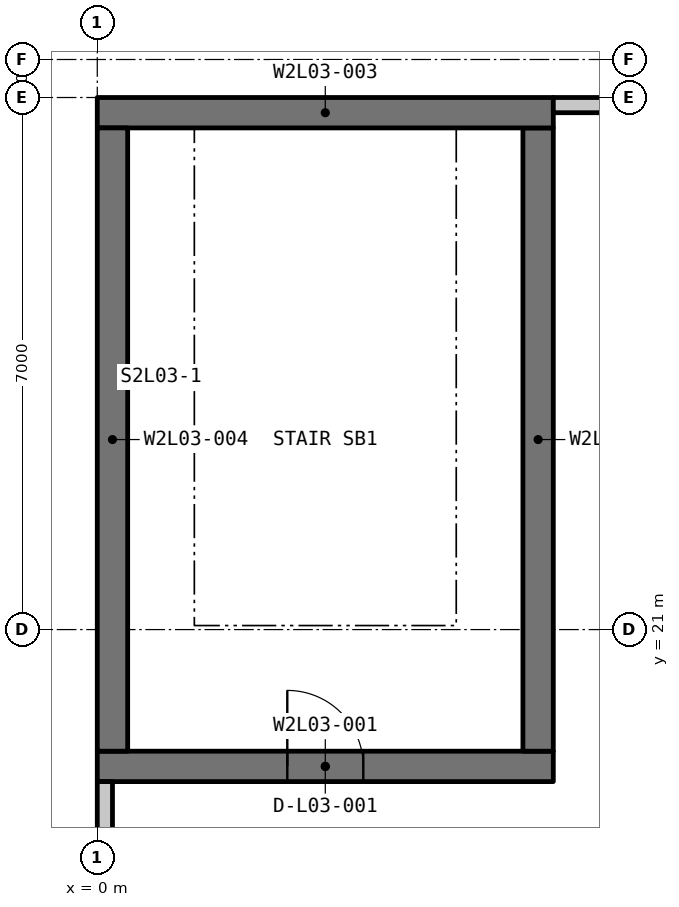
"""IFC4 building model, lengths in metres.
Left out: names, types, materials, properties, quantities, classifications, styles, units other than length and angle.
Written with IfcOpenShell. Run it as: python <this file> out.ifc"""

import sys

from ifc_helpers import new_model, si_unit, direction, frame, frame_2d, origin, place, context, subcontext, project, spatial, rectangle, extrude, element, fill, save


model = new_model("IFC4")
c1 = context("Model", 3, precision=1e-05, world=origin(), true_north=direction((0.0, 1.0)))
c2 = subcontext(c1, "Body", "Model", "MODEL_VIEW")
j1 = project(units=[si_unit("LENGTHUNIT", "METRE"), si_unit("PLANEANGLEUNIT", "RADIAN")], contexts=[c1])
p1 = place(None, origin())
s1 = spatial("IfcSite", under=j1, at=p1, CompositionType="ELEMENT")
p2 = place(p1, origin())
s2 = spatial("IfcBuilding", under=s1, at=p2, CompositionType="ELEMENT")
p3 = place(p2, frame((0.0, 0.0, 15.75)))
s3 = spatial("IfcBuildingStorey", under=s2, at=p3, CompositionType="ELEMENT", Elevation=15.75)
p4 = place(p3, frame((0.0, 19.2, -0.3), z_axis=(0.0, 0.0, 1.0), x_axis=(1.0, 0.0, 0.0)))
e1 = element("IfcWall", 1, at=p4, inside=s3, PredefinedType="SHEAR", context=c2, shape_type="SweptSolid", body=[
    extrude(rectangle(XDim=6.0, YDim=0.4, at=frame_2d((3.0, 0.0))), origin(), (0.0, 0.0, 1.0), 3.05),
])
p5 = place(p4, frame((2.5, 0.0, 0.3)))
e2 = element("IfcOpeningElement", 2, at=p5, cuts=e1, PredefinedType="OPENING", context=c2, shape_type="SweptSolid", body=[
    extrude(rectangle(XDim=1.0, YDim=2.2, at=frame_2d((0.5, 1.1))), frame((0.0, 0.21, 0.0), z_axis=(0.0, -1.0, 0.0), x_axis=(1.0, 0.0, 0.0)), (0.0, 0.0, 1.0), 0.42),
])
p6 = place(p3, frame((5.8, 19.4, -0.3), z_axis=(0.0, 0.0, 1.0), x_axis=(0.0, 1.0, 0.0)))
e3 = element("IfcWall", 3, at=p6, inside=s3, PredefinedType="SHEAR", context=c2, shape_type="SweptSolid", body=[
    extrude(rectangle(XDim=8.2, YDim=0.4, at=frame_2d((4.1, 0.0))), origin(), (0.0, 0.0, 1.0), 3.05),
])
p7 = place(p3, frame((0.0, 27.8, -0.3), z_axis=(0.0, 0.0, 1.0), x_axis=(1.0, 0.0, 0.0)))
e4 = element("IfcWall", 4, at=p7, inside=s3, PredefinedType="SHEAR", context=c2, shape_type="SweptSolid", body=[
    extrude(rectangle(XDim=6.0, YDim=0.4, at=frame_2d((3.0, 0.0))), origin(), (0.0, 0.0, 1.0), 3.05),
])
p8 = place(p3, frame((0.2, 19.4, -0.3), z_axis=(0.0, 0.0, 1.0), x_axis=(0.0, 1.0, 0.0)))
e5 = element("IfcWall", 5, at=p8, inside=s3, PredefinedType="SHEAR", context=c2, shape_type="SweptSolid", body=[
    extrude(rectangle(XDim=8.2, YDim=0.4, at=frame_2d((4.1, 0.0))), origin(), (0.0, 0.0, 1.0), 3.05),
])
p9 = place(p3, frame((6.0, 27.9, 0.0), z_axis=(0.0, 0.0, 1.0), x_axis=(1.0, 0.0, 0.0)))
e6 = element("IfcWall", 6, at=p9, inside=s3, PredefinedType="PARAPET", context=c2, shape_type="SweptSolid", body=[
    extrude(rectangle(XDim=8.449, YDim=0.2, at=frame_2d((4.225, 0.0))), origin(), (0.0, 0.0, 1.0), 1.2),
])
p10 = place(p3, frame((0.1, 6.2, 0.0), z_axis=(0.0, 0.0, 1.0), x_axis=(0.0, 1.0, 0.0)))
e7 = element("IfcWall", 7, at=p10, inside=s3, PredefinedType="PARAPET", context=c2, shape_type="SweptSolid", body=[
    extrude(rectangle(XDim=12.8, YDim=0.2, at=frame_2d((6.4, 0.0))), origin(), (0.0, 0.0, 1.0), 1.2),
])
p11 = place(p5, origin())
e8 = element("IfcDoor", 8, at=p11, inside=s3, OperationType="SINGLE_SWING_LEFT", PredefinedType="DOOR", context=c2, shape_type="SweptSolid", body=[
    extrude(rectangle(XDim=1.0, YDim=2.2, at=frame_2d((0.5, 1.1))), frame((0.0, 0.025, 0.0), z_axis=(0.0, -1.0, 0.0), x_axis=(1.0, 0.0, 0.0)), (0.0, 0.0, 1.0), 0.05),
])
fill(e2, e8)
save(model, sys.argv[1])
